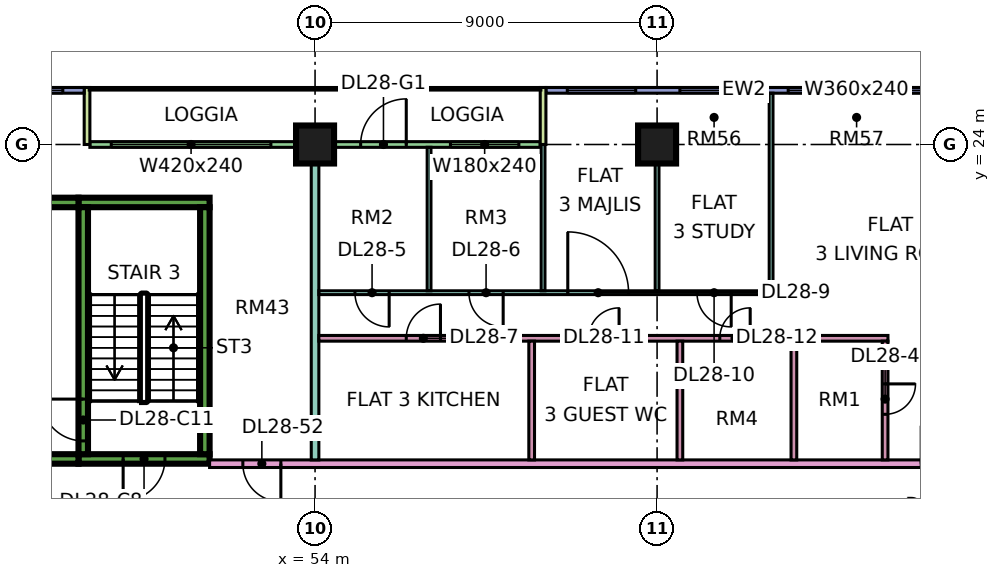
"""IFC4 building model, lengths in metres.
Left out: names, types, materials, properties, quantities, classifications, styles, units other than length and angle.
Written with IfcOpenShell. Run it as: python <this file> out.ifc"""

import sys

from ifc_helpers import new_model, si_unit, direction, frame, frame_2d, origin, origin_2d, place, context, subcontext, project, spatial, rectangle, extrude, element, fill, save


model = new_model("IFC4")
c1 = context("Model", 3, precision=1e-05, world=origin(), true_north=direction((0.0, 1.0)))
c2 = subcontext(c1, "Body", "Model", "MODEL_VIEW")
j1 = project(units=[si_unit("LENGTHUNIT", "METRE"), si_unit("PLANEANGLEUNIT", "RADIAN")], contexts=[c1])
p1 = place(None, origin())
s1 = spatial("IfcSite", under=j1, at=p1, CompositionType="ELEMENT")
p2 = place(p1, origin())
s2 = spatial("IfcBuilding", under=s1, at=p2, CompositionType="ELEMENT")
p3 = place(p2, frame((0.0, 0.0, 121.9)))
s3 = spatial("IfcBuildingStorey", under=s2, at=p3, CompositionType="ELEMENT", Elevation=121.9)
for number, where, z_axis, x_axis in (
    (1, (54.0, 24.0, 0.0), (0.0, 0.0, 1.0), (1.0, 0.0, 0.0)),
    (2, (63.0, 24.0, 0.0), (0.0, 0.0, 1.0), (1.0, 0.0, 0.0)),
):
    element("IfcColumn", number, at=place(p3, frame(where, z_axis=z_axis, x_axis=x_axis)), inside=s3, PredefinedType="COLUMN", context=c2, shape_type="SweptSolid", body=[
        extrude(rectangle(XDim=1.0, YDim=1.0, at=origin_2d()), origin(), (0.0, 0.0, 1.0), 3.75),
    ])
p4 = place(p3, frame((47.775, 15.725, 0.0), z_axis=(0.0, 0.0, 1.0), x_axis=(1.0, 0.0, 0.0)))
e3 = element("IfcWall", 3, at=p4, inside=s3, PredefinedType="SHEAR", context=c2, shape_type="SweptSolid", body=[
    extrude(rectangle(XDim=3.45, YDim=0.25, at=frame_2d((1.725, 0.0))), origin(), (0.0, 0.0, 1.0), 3.75),
])
p5 = place(p4, frame((1.175, 0.0, 0.0)))
e4 = element("IfcOpeningElement", 4, at=p5, cuts=e3, PredefinedType="OPENING", context=c2, shape_type="SweptSolid", body=[
    extrude(rectangle(XDim=1.1, YDim=2.2, at=frame_2d((0.55, 1.1))), frame((0.0, 0.135, 0.0), z_axis=(0.0, -1.0, 0.0), x_axis=(1.0, 0.0, 0.0)), (0.0, 0.0, 1.0), 0.27),
])
p6 = place(p3, frame((47.775, 22.475, 0.0), z_axis=(0.0, 0.0, 1.0), x_axis=(1.0, 0.0, 0.0)))
e5 = element("IfcWall", 5, at=p6, inside=s3, PredefinedType="SHEAR", context=c2, shape_type="SweptSolid", body=[
    extrude(rectangle(XDim=3.45, YDim=0.25, at=frame_2d((1.725, 0.0))), origin(), (0.0, 0.0, 1.0), 3.75),
])
p7 = place(p3, frame((47.9, 15.85, 0.0), z_axis=(0.0, 0.0, 1.0), x_axis=(0.0, 1.0, 0.0)))
e6 = element("IfcWall", 6, at=p7, inside=s3, PredefinedType="SHEAR", context=c2, shape_type="SweptSolid", body=[
    extrude(rectangle(XDim=6.5, YDim=0.25, at=frame_2d((3.25, 0.0))), origin(), (0.0, 0.0, 1.0), 3.75),
])
p8 = place(p7, frame((0.35, 0.0, 0.0)))
e7 = element("IfcOpeningElement", 7, at=p8, cuts=e6, PredefinedType="OPENING", context=c2, shape_type="SweptSolid", body=[
    extrude(rectangle(XDim=1.1, YDim=2.2, at=frame_2d((0.55, 1.1))), frame((0.0, 0.135, 0.0), z_axis=(0.0, -1.0, 0.0), x_axis=(1.0, 0.0, 0.0)), (0.0, 0.0, 1.0), 0.27),
])
p9 = place(p3, frame((51.1, 15.85, 0.0), z_axis=(0.0, 0.0, 1.0), x_axis=(0.0, 1.0, 0.0)))
e8 = element("IfcWall", 8, at=p9, inside=s3, PredefinedType="SHEAR", context=c2, shape_type="SweptSolid", body=[
    extrude(rectangle(XDim=6.5, YDim=0.25, at=frame_2d((3.25, 0.0))), origin(), (0.0, 0.0, 1.0), 3.75),
])
p10 = place(p3, frame((44.35, 15.725, 0.0), z_axis=(0.0, 0.0, 1.0), x_axis=(1.0, 0.0, 0.0)))
e9 = element("IfcWall", 9, at=p10, inside=s3, PredefinedType="SHEAR", context=c2, shape_type="SweptSolid", body=[
    extrude(rectangle(XDim=3.425, YDim=0.25, at=frame_2d((1.712, 0.0))), origin(), (0.0, 0.0, 1.0), 3.75),
])
p11 = place(p10, frame((1.25, 0.0, 0.0)))
e10 = element("IfcOpeningElement", 10, at=p11, cuts=e9, PredefinedType="OPENING", context=c2, shape_type="SweptSolid", body=[
    extrude(rectangle(XDim=1.2, YDim=2.2, at=frame_2d((0.6, 1.1))), frame((0.0, 0.135, 0.0), z_axis=(0.0, -1.0, 0.0), x_axis=(1.0, 0.0, 0.0)), (0.0, 0.0, 1.0), 0.27),
])
p12 = place(p3, frame((44.35, 22.475, 0.0), z_axis=(0.0, 0.0, 1.0), x_axis=(1.0, 0.0, 0.0)))
e11 = element("IfcWall", 11, at=p12, inside=s3, PredefinedType="SHEAR", context=c2, shape_type="SweptSolid", body=[
    extrude(rectangle(XDim=3.425, YDim=0.25, at=frame_2d((1.712, 0.0))), origin(), (0.0, 0.0, 1.0), 3.75),
])
p13 = place(p3, frame((70.5, 25.425, 0.0), z_axis=(0.0, 0.0, 1.0), x_axis=(-1.0, 0.0, 0.0)))
e12 = element("IfcWall", 12, at=p13, inside=s3, PredefinedType="SOLIDWALL", context=c2, shape_type="SweptSolid", body=[
    extrude(rectangle(XDim=10.425, YDim=0.15, at=frame_2d((5.212, 0.0))), origin(), (0.0, 0.0, 1.0), 3.35),
])
p14 = place(p13, frame((0.45, 0.0, 0.45)))
e13 = element("IfcOpeningElement", 13, at=p14, cuts=e12, PredefinedType="OPENING", context=c2, shape_type="SweptSolid", body=[
    extrude(rectangle(XDim=3.6, YDim=2.4, at=frame_2d((1.8, 1.2))), frame((0.0, 0.085, 0.0), z_axis=(0.0, -1.0, 0.0), x_axis=(1.0, 0.0, 0.0)), (0.0, 0.0, 1.0), 0.17),
])
p15 = place(p13, frame((5.1, 0.0, 0.45)))
e14 = element("IfcOpeningElement", 14, at=p15, cuts=e12, PredefinedType="OPENING", context=c2, shape_type="SweptSolid", body=[
    extrude(rectangle(XDim=1.8, YDim=2.4, at=frame_2d((0.9, 1.2))), frame((0.0, 0.085, 0.0), z_axis=(0.0, -1.0, 0.0), x_axis=(1.0, 0.0, 0.0)), (0.0, 0.0, 1.0), 0.17),
])
p16 = place(p13, frame((8.062, 0.0, 0.45)))
e15 = element("IfcOpeningElement", 15, at=p16, cuts=e12, PredefinedType="OPENING", context=c2, shape_type="SweptSolid", body=[
    extrude(rectangle(XDim=1.8, YDim=2.4, at=frame_2d((0.9, 1.2))), frame((0.0, 0.085, 0.0), z_axis=(0.0, -1.0, 0.0), x_axis=(1.0, 0.0, 0.0)), (0.0, 0.0, 1.0), 0.17),
])
p17 = place(p3, frame((59.925, 24.0, 0.0), z_axis=(0.0, 0.0, 1.0), x_axis=(-1.0, 0.0, 0.0)))
e16 = element("IfcWall", 16, at=p17, inside=s3, PredefinedType="SOLIDWALL", context=c2, shape_type="SweptSolid", body=[
    extrude(rectangle(XDim=11.85, YDim=0.15, at=frame_2d((5.925, 0.0))), origin(), (0.0, 0.0, 1.0), 3.35),
])
p18 = place(p17, frame((0.562, 0.0, 0.45)))
e17 = element("IfcOpeningElement", 17, at=p18, cuts=e16, PredefinedType="OPENING", context=c2, shape_type="SweptSolid", body=[
    extrude(rectangle(XDim=1.8, YDim=2.4, at=frame_2d((0.9, 1.2))), frame((0.0, 0.085, 0.0), z_axis=(0.0, -1.0, 0.0), x_axis=(1.0, 0.0, 0.0)), (0.0, 0.0, 1.0), 0.17),
])
p19 = place(p17, frame((3.525, 0.0, 0.0)))
e18 = element("IfcOpeningElement", 18, at=p19, cuts=e16, PredefinedType="OPENING", context=c2, shape_type="SweptSolid", body=[
    extrude(rectangle(XDim=1.2, YDim=2.4, at=frame_2d((0.6, 1.2))), frame((0.0, 0.085, 0.0), z_axis=(0.0, -1.0, 0.0), x_axis=(1.0, 0.0, 0.0)), (0.0, 0.0, 1.0), 0.17),
])
p20 = place(p17, frame((7.087, 0.0, 0.45)))
e19 = element("IfcOpeningElement", 19, at=p20, cuts=e16, PredefinedType="OPENING", context=c2, shape_type="SweptSolid", body=[
    extrude(rectangle(XDim=4.2, YDim=2.4, at=frame_2d((2.1, 1.2))), frame((0.0, 0.085, 0.0), z_axis=(0.0, -1.0, 0.0), x_axis=(1.0, 0.0, 0.0)), (0.0, 0.0, 1.0), 0.17),
])
for number, where, z_axis, x_axis in (
    (20, (60.0, 25.5, 0.0), (0.0, 0.0, 1.0), (0.0, -1.0, 0.0)),
    (21, (48.0, 25.5, 0.0), (0.0, 0.0, 1.0), (0.0, -1.0, 0.0)),
):
    element("IfcWall", number, at=place(p3, frame(where, z_axis=z_axis, x_axis=x_axis)), inside=s3, PredefinedType="SOLIDWALL", context=c2, shape_type="SweptSolid", body=[
        extrude(rectangle(XDim=1.5, YDim=0.15, at=frame_2d((0.75, 0.0))), origin(), (0.0, 0.0, 1.0), 3.35),
    ])
p21 = place(p3, frame((47.925, 25.425, 0.0), z_axis=(0.0, 0.0, 1.0), x_axis=(-1.0, 0.0, 0.0)))
e22 = element("IfcWall", 22, at=p21, inside=s3, PredefinedType="SOLIDWALL", context=c2, shape_type="SweptSolid", body=[
    extrude(rectangle(XDim=7.425, YDim=0.15, at=frame_2d((3.712, 0.0))), origin(), (0.0, 0.0, 1.0), 3.35),
])
p22 = place(p21, frame((0.562, 0.0, 0.45)))
e23 = element("IfcOpeningElement", 23, at=p22, cuts=e22, PredefinedType="OPENING", context=c2, shape_type="SweptSolid", body=[
    extrude(rectangle(XDim=1.8, YDim=2.4, at=frame_2d((0.9, 1.2))), frame((0.0, 0.085, 0.0), z_axis=(0.0, -1.0, 0.0), x_axis=(1.0, 0.0, 0.0)), (0.0, 0.0, 1.0), 0.17),
])
p23 = place(p21, frame((3.675, 0.0, 0.45)))
e24 = element("IfcOpeningElement", 24, at=p23, cuts=e22, PredefinedType="OPENING", context=c2, shape_type="SweptSolid", body=[
    extrude(rectangle(XDim=3.0, YDim=2.4, at=frame_2d((1.5, 1.2))), frame((0.0, 0.085, 0.0), z_axis=(0.0, -1.0, 0.0), x_axis=(1.0, 0.0, 0.0)), (0.0, 0.0, 1.0), 0.17),
])
p24 = place(p3, frame((51.225, 15.6, 0.0), z_axis=(0.0, 0.0, 1.0), x_axis=(1.0, 0.0, 0.0)))
e25 = element("IfcWall", 25, at=p24, inside=s3, PredefinedType="PARTITIONING", context=c2, shape_type="SweptSolid", body=[
    extrude(rectangle(XDim=22.125, YDim=0.2, at=frame_2d((11.062, 0.0))), origin(), (0.0, 0.0, 1.0), 3.35),
])
p25 = place(p24, frame((18.725, 0.0, 0.0)))
e26 = element("IfcOpeningElement", 26, at=p25, cuts=e25, PredefinedType="OPENING", context=c2, shape_type="SweptSolid", body=[
    extrude(rectangle(XDim=1.0, YDim=2.1, at=frame_2d((0.5, 1.05))), frame((0.0, 0.11, 0.0), z_axis=(0.0, -1.0, 0.0), x_axis=(1.0, 0.0, 0.0)), (0.0, 0.0, 1.0), 0.22),
])
p26 = place(p24, frame((0.875, 0.0, 0.0)))
e27 = element("IfcOpeningElement", 27, at=p26, cuts=e25, PredefinedType="OPENING", context=c2, shape_type="SweptSolid", body=[
    extrude(rectangle(XDim=1.0, YDim=2.1, at=frame_2d((0.5, 1.05))), frame((0.0, 0.11, 0.0), z_axis=(0.0, -1.0, 0.0), x_axis=(1.0, 0.0, 0.0)), (0.0, 0.0, 1.0), 0.22),
])
p27 = place(p3, frame((54.0, 15.7, 0.0), z_axis=(0.0, 0.0, 1.0), x_axis=(0.0, 1.0, 0.0)))
e28 = element("IfcWall", 28, at=p27, inside=s3, PredefinedType="PARTITIONING", context=c2, shape_type="SweptSolid", body=[
    extrude(rectangle(XDim=8.226, YDim=0.2, at=frame_2d((4.113, 0.0))), origin(), (0.0, 0.0, 1.0), 3.35),
])
p28 = place(p3, frame((54.1, 18.9, 0.0), z_axis=(0.0, 0.0, 1.0), x_axis=(1.0, 0.0, 0.0)))
e29 = element("IfcWall", 29, at=p28, inside=s3, PredefinedType="PARTITIONING", context=c2, shape_type="SweptSolid", body=[
    extrude(rectangle(XDim=14.975, YDim=0.15, at=frame_2d((7.487, 0.0))), origin(), (0.0, 0.0, 1.0), 3.35),
])
p29 = place(p28, frame((2.3, 0.0, 0.0)))
e30 = element("IfcOpeningElement", 30, at=p29, cuts=e29, PredefinedType="OPENING", context=c2, shape_type="SweptSolid", body=[
    extrude(rectangle(XDim=0.9, YDim=2.1, at=frame_2d((0.45, 1.05))), frame((0.0, 0.085, 0.0), z_axis=(0.0, -1.0, 0.0), x_axis=(1.0, 0.0, 0.0)), (0.0, 0.0, 1.0), 0.17),
])
p30 = place(p28, frame((7.1, 0.0, 0.0)))
e31 = element("IfcOpeningElement", 31, at=p30, cuts=e29, PredefinedType="OPENING", context=c2, shape_type="SweptSolid", body=[
    extrude(rectangle(XDim=0.8, YDim=2.1, at=frame_2d((0.4, 1.05))), frame((0.0, 0.085, 0.0), z_axis=(0.0, -1.0, 0.0), x_axis=(1.0, 0.0, 0.0)), (0.0, 0.0, 1.0), 0.17),
])
p31 = place(p28, frame((10.55, 0.0, 0.0)))
e32 = element("IfcOpeningElement", 32, at=p31, cuts=e29, PredefinedType="OPENING", context=c2, shape_type="SweptSolid", body=[
    extrude(rectangle(XDim=0.8, YDim=2.1, at=frame_2d((0.4, 1.05))), frame((0.0, 0.085, 0.0), z_axis=(0.0, -1.0, 0.0), x_axis=(1.0, 0.0, 0.0)), (0.0, 0.0, 1.0), 0.17),
])
p32 = place(p3, frame((54.1, 20.1, 0.0), z_axis=(0.0, 0.0, 1.0), x_axis=(1.0, 0.0, 0.0)))
e33 = element("IfcWall", 33, at=p32, inside=s3, PredefinedType="PARTITIONING", context=c2, shape_type="SweptSolid", body=[
    extrude(rectangle(XDim=11.95, YDim=0.1, at=frame_2d((5.975, 0.0))), origin(), (0.0, 0.0, 1.0), 3.35),
])
p33 = place(p32, frame((0.95, 0.0, 0.0)))
e34 = element("IfcOpeningElement", 34, at=p33, cuts=e33, PredefinedType="OPENING", context=c2, shape_type="SweptSolid", body=[
    extrude(rectangle(XDim=0.9, YDim=2.1, at=frame_2d((0.45, 1.05))), frame((0.0, 0.06, 0.0), z_axis=(0.0, -1.0, 0.0), x_axis=(1.0, 0.0, 0.0)), (0.0, 0.0, 1.0), 0.12),
])
p34 = place(p32, frame((3.95, 0.0, 0.0)))
e35 = element("IfcOpeningElement", 35, at=p34, cuts=e33, PredefinedType="OPENING", context=c2, shape_type="SweptSolid", body=[
    extrude(rectangle(XDim=0.9, YDim=2.1, at=frame_2d((0.45, 1.05))), frame((0.0, 0.06, 0.0), z_axis=(0.0, -1.0, 0.0), x_axis=(1.0, 0.0, 0.0)), (0.0, 0.0, 1.0), 0.12),
])
p35 = place(p32, frame((6.55, 0.0, 0.0)))
e36 = element("IfcOpeningElement", 36, at=p35, cuts=e33, PredefinedType="OPENING", context=c2, shape_type="SweptSolid", body=[
    extrude(rectangle(XDim=1.6, YDim=2.1, at=frame_2d((0.8, 1.05))), frame((0.0, 0.06, 0.0), z_axis=(0.0, -1.0, 0.0), x_axis=(1.0, 0.0, 0.0)), (0.0, 0.0, 1.0), 0.12),
])
p36 = place(p32, frame((9.95, 0.0, 0.0)))
e37 = element("IfcOpeningElement", 37, at=p36, cuts=e33, PredefinedType="OPENING", context=c2, shape_type="SweptSolid", body=[
    extrude(rectangle(XDim=0.9, YDim=2.1, at=frame_2d((0.45, 1.05))), frame((0.0, 0.06, 0.0), z_axis=(0.0, -1.0, 0.0), x_axis=(1.0, 0.0, 0.0)), (0.0, 0.0, 1.0), 0.12),
])
p37 = place(p3, frame((57.0, 20.15, 0.0), z_axis=(0.0, 0.0, 1.0), x_axis=(0.0, 1.0, 0.0)))
e38 = element("IfcWall", 38, at=p37, inside=s3, PredefinedType="PARTITIONING", context=c2, shape_type="SweptSolid", body=[
    extrude(rectangle(XDim=3.776, YDim=0.1, at=frame_2d((1.888, 0.0))), origin(), (0.0, 0.0, 1.0), 3.35),
])
p38 = place(p3, frame((59.7, 15.7, 0.0), z_axis=(0.0, 0.0, 1.0), x_axis=(0.0, 1.0, 0.0)))
e39 = element("IfcWall", 39, at=p38, inside=s3, PredefinedType="PARTITIONING", context=c2, shape_type="SweptSolid", body=[
    extrude(rectangle(XDim=3.125, YDim=0.15, at=frame_2d((1.562, 0.0))), origin(), (0.0, 0.0, 1.0), 3.35),
])
for number, where, z_axis, x_axis in (
    (40, (60.0, 20.15, 0.0), (0.0, 0.0, 1.0), (0.0, 1.0, 0.0)),
    (41, (63.0, 20.15, 0.0), (0.0, 0.0, 1.0), (0.0, 1.0, 0.0)),
):
    element("IfcWall", number, at=place(p3, frame(where, z_axis=z_axis, x_axis=x_axis)), inside=s3, PredefinedType="PARTITIONING", context=c2, shape_type="SweptSolid", body=[
        extrude(rectangle(XDim=3.85, YDim=0.1, at=frame_2d((1.925, 0.0))), origin(), (0.0, 0.0, 1.0), 3.35),
    ])
p39 = place(p3, frame((63.6, 15.7, 0.0), z_axis=(0.0, 0.0, 1.0), x_axis=(0.0, 1.0, 0.0)))
e42 = element("IfcWall", 42, at=p39, inside=s3, PredefinedType="PARTITIONING", context=c2, shape_type="SweptSolid", body=[
    extrude(rectangle(XDim=3.125, YDim=0.15, at=frame_2d((1.562, 0.0))), origin(), (0.0, 0.0, 1.0), 3.35),
])
p40 = place(p3, frame((66.0, 20.15, 0.0), z_axis=(0.0, 0.0, 1.0), x_axis=(0.0, 1.0, 0.0)))
e43 = element("IfcWall", 43, at=p40, inside=s3, PredefinedType="PARTITIONING", context=c2, shape_type="SweptSolid", body=[
    extrude(rectangle(XDim=5.2, YDim=0.1, at=frame_2d((2.6, 0.0))), origin(), (0.0, 0.0, 1.0), 3.35),
])
p41 = place(p3, frame((66.6, 15.7, 0.0), z_axis=(0.0, 0.0, 1.0), x_axis=(0.0, 1.0, 0.0)))
e44 = element("IfcWall", 44, at=p41, inside=s3, PredefinedType="PARTITIONING", context=c2, shape_type="SweptSolid", body=[
    extrude(rectangle(XDim=3.125, YDim=0.15, at=frame_2d((1.562, 0.0))), origin(), (0.0, 0.0, 1.0), 3.35),
])
p42 = place(p3, frame((69.0, 15.7, 0.0), z_axis=(0.0, 0.0, 1.0), x_axis=(0.0, 1.0, 0.0)))
e45 = element("IfcWall", 45, at=p42, inside=s3, PredefinedType="PARTITIONING", context=c2, shape_type="SweptSolid", body=[
    extrude(rectangle(XDim=3.125, YDim=0.15, at=frame_2d((1.562, 0.0))), origin(), (0.0, 0.0, 1.0), 3.35),
])
p43 = place(p42, frame((1.2, 0.0, 0.0)))
e46 = element("IfcOpeningElement", 46, at=p43, cuts=e45, PredefinedType="OPENING", context=c2, shape_type="SweptSolid", body=[
    extrude(rectangle(XDim=0.8, YDim=2.1, at=frame_2d((0.4, 1.05))), frame((0.0, 0.085, 0.0), z_axis=(0.0, -1.0, 0.0), x_axis=(1.0, 0.0, 0.0)), (0.0, 0.0, 1.0), 0.17),
])
p44 = place(p14, origin())
e47 = element("IfcWindow", 47, at=p44, inside=s3, PartitioningType="SINGLE_PANEL", PredefinedType="WINDOW", context=c2, shape_type="SweptSolid", body=[
    extrude(rectangle(XDim=3.6, YDim=2.4, at=frame_2d((1.8, 1.2))), frame((0.0, 0.03, 0.0), z_axis=(0.0, -1.0, 0.0), x_axis=(1.0, 0.0, 0.0)), (0.0, 0.0, 1.0), 0.06),
])
fill(e13, e47)
p45 = place(p15, origin())
e48 = element("IfcWindow", 48, at=p45, inside=s3, PartitioningType="SINGLE_PANEL", PredefinedType="WINDOW", context=c2, shape_type="SweptSolid", body=[
    extrude(rectangle(XDim=1.8, YDim=2.4, at=frame_2d((0.9, 1.2))), frame((0.0, 0.03, 0.0), z_axis=(0.0, -1.0, 0.0), x_axis=(1.0, 0.0, 0.0)), (0.0, 0.0, 1.0), 0.06),
])
fill(e14, e48)
p46 = place(p16, origin())
e49 = element("IfcWindow", 49, at=p46, inside=s3, PartitioningType="SINGLE_PANEL", PredefinedType="WINDOW", context=c2, shape_type="SweptSolid", body=[
    extrude(rectangle(XDim=1.8, YDim=2.4, at=frame_2d((0.9, 1.2))), frame((0.0, 0.03, 0.0), z_axis=(0.0, -1.0, 0.0), x_axis=(1.0, 0.0, 0.0)), (0.0, 0.0, 1.0), 0.06),
])
fill(e15, e49)
p47 = place(p18, origin())
e50 = element("IfcWindow", 50, at=p47, inside=s3, PartitioningType="SINGLE_PANEL", PredefinedType="WINDOW", context=c2, shape_type="SweptSolid", body=[
    extrude(rectangle(XDim=1.8, YDim=2.4, at=frame_2d((0.9, 1.2))), frame((0.0, 0.03, 0.0), z_axis=(0.0, -1.0, 0.0), x_axis=(1.0, 0.0, 0.0)), (0.0, 0.0, 1.0), 0.06),
])
fill(e17, e50)
p48 = place(p19, frame((1.2, 0.0, 0.0), z_axis=(0.0, 0.0, 1.0), x_axis=(-1.0, 0.0, 0.0)))
e51 = element("IfcDoor", 51, at=p48, inside=s3, OperationType="DOUBLE_DOOR_SINGLE_SWING", PredefinedType="DOOR", context=c2, shape_type="SweptSolid", body=[
    extrude(rectangle(XDim=1.2, YDim=2.4, at=frame_2d((0.6, 1.2))), frame((0.0, 0.025, 0.0), z_axis=(0.0, -1.0, 0.0), x_axis=(1.0, 0.0, 0.0)), (0.0, 0.0, 1.0), 0.05),
])
fill(e18, e51)
p49 = place(p20, origin())
e52 = element("IfcWindow", 52, at=p49, inside=s3, PartitioningType="SINGLE_PANEL", PredefinedType="WINDOW", context=c2, shape_type="SweptSolid", body=[
    extrude(rectangle(XDim=4.2, YDim=2.4, at=frame_2d((2.1, 1.2))), frame((0.0, 0.03, 0.0), z_axis=(0.0, -1.0, 0.0), x_axis=(1.0, 0.0, 0.0)), (0.0, 0.0, 1.0), 0.06),
])
fill(e19, e52)
p50 = place(p22, origin())
e53 = element("IfcWindow", 53, at=p50, inside=s3, PartitioningType="SINGLE_PANEL", PredefinedType="WINDOW", context=c2, shape_type="SweptSolid", body=[
    extrude(rectangle(XDim=1.8, YDim=2.4, at=frame_2d((0.9, 1.2))), frame((0.0, 0.03, 0.0), z_axis=(0.0, -1.0, 0.0), x_axis=(1.0, 0.0, 0.0)), (0.0, 0.0, 1.0), 0.06),
])
fill(e23, e53)
p51 = place(p5, frame((1.1, 0.0, 0.0), z_axis=(0.0, 0.0, 1.0), x_axis=(-1.0, 0.0, 0.0)))
e54 = element("IfcDoor", 54, at=p51, inside=s3, OperationType="SINGLE_SWING_LEFT", PredefinedType="DOOR", context=c2, shape_type="SweptSolid", body=[
    extrude(rectangle(XDim=1.1, YDim=2.2, at=frame_2d((0.55, 1.1))), frame((0.0, 0.025, 0.0), z_axis=(0.0, -1.0, 0.0), x_axis=(1.0, 0.0, 0.0)), (0.0, 0.0, 1.0), 0.05),
])
fill(e4, e54)
p52 = place(p8, frame((1.1, 0.0, 0.0), z_axis=(0.0, 0.0, 1.0), x_axis=(-1.0, 0.0, 0.0)))
e55 = element("IfcDoor", 55, at=p52, inside=s3, OperationType="SINGLE_SWING_RIGHT", PredefinedType="DOOR", context=c2, shape_type="SweptSolid", body=[
    extrude(rectangle(XDim=1.1, YDim=2.2, at=frame_2d((0.55, 1.1))), frame((0.0, 0.025, 0.0), z_axis=(0.0, -1.0, 0.0), x_axis=(1.0, 0.0, 0.0)), (0.0, 0.0, 1.0), 0.05),
])
fill(e7, e55)
p53 = place(p43, origin())
e56 = element("IfcDoor", 56, at=p53, inside=s3, OperationType="SINGLE_SWING_RIGHT", PredefinedType="DOOR", context=c2, shape_type="SweptSolid", body=[
    extrude(rectangle(XDim=0.8, YDim=2.1, at=frame_2d((0.4, 1.05))), frame((0.0, 0.025, 0.0), z_axis=(0.0, -1.0, 0.0), x_axis=(1.0, 0.0, 0.0)), (0.0, 0.0, 1.0), 0.05),
])
fill(e46, e56)
p54 = place(p33, origin())
e57 = element("IfcDoor", 57, at=p54, inside=s3, OperationType="SINGLE_SWING_RIGHT", PredefinedType="DOOR", context=c2, shape_type="SweptSolid", body=[
    extrude(rectangle(XDim=0.9, YDim=2.1, at=frame_2d((0.45, 1.05))), frame((0.0, 0.025, 0.0), z_axis=(0.0, -1.0, 0.0), x_axis=(1.0, 0.0, 0.0)), (0.0, 0.0, 1.0), 0.05),
])
fill(e34, e57)
p55 = place(p34, origin())
e58 = element("IfcDoor", 58, at=p55, inside=s3, OperationType="SINGLE_SWING_RIGHT", PredefinedType="DOOR", context=c2, shape_type="SweptSolid", body=[
    extrude(rectangle(XDim=0.9, YDim=2.1, at=frame_2d((0.45, 1.05))), frame((0.0, 0.025, 0.0), z_axis=(0.0, -1.0, 0.0), x_axis=(1.0, 0.0, 0.0)), (0.0, 0.0, 1.0), 0.05),
])
fill(e35, e58)
p56 = place(p29, frame((0.9, 0.0, 0.0), z_axis=(0.0, 0.0, 1.0), x_axis=(-1.0, 0.0, 0.0)))
e59 = element("IfcDoor", 59, at=p56, inside=s3, OperationType="SINGLE_SWING_RIGHT", PredefinedType="DOOR", context=c2, shape_type="SweptSolid", body=[
    extrude(rectangle(XDim=0.9, YDim=2.1, at=frame_2d((0.45, 1.05))), frame((0.0, 0.025, 0.0), z_axis=(0.0, -1.0, 0.0), x_axis=(1.0, 0.0, 0.0)), (0.0, 0.0, 1.0), 0.05),
])
fill(e30, e59)
p57 = place(p35, origin())
e60 = element("IfcDoor", 60, at=p57, inside=s3, OperationType="DOUBLE_DOOR_SINGLE_SWING", PredefinedType="DOOR", context=c2, shape_type="SweptSolid", body=[
    extrude(rectangle(XDim=1.6, YDim=2.1, at=frame_2d((0.8, 1.05))), frame((0.0, 0.025, 0.0), z_axis=(0.0, -1.0, 0.0), x_axis=(1.0, 0.0, 0.0)), (0.0, 0.0, 1.0), 0.05),
])
fill(e36, e60)
p58 = place(p36, origin())
e61 = element("IfcDoor", 61, at=p58, inside=s3, OperationType="SINGLE_SWING_RIGHT", PredefinedType="DOOR", context=c2, shape_type="SweptSolid", body=[
    extrude(rectangle(XDim=0.9, YDim=2.1, at=frame_2d((0.45, 1.05))), frame((0.0, 0.025, 0.0), z_axis=(0.0, -1.0, 0.0), x_axis=(1.0, 0.0, 0.0)), (0.0, 0.0, 1.0), 0.05),
])
fill(e37, e61)
p59 = place(p30, frame((0.8, 0.0, 0.0), z_axis=(0.0, 0.0, 1.0), x_axis=(-1.0, 0.0, 0.0)))
e62 = element("IfcDoor", 62, at=p59, inside=s3, OperationType="SINGLE_SWING_RIGHT", PredefinedType="DOOR", context=c2, shape_type="SweptSolid", body=[
    extrude(rectangle(XDim=0.8, YDim=2.1, at=frame_2d((0.4, 1.05))), frame((0.0, 0.025, 0.0), z_axis=(0.0, -1.0, 0.0), x_axis=(1.0, 0.0, 0.0)), (0.0, 0.0, 1.0), 0.05),
])
fill(e31, e62)
p60 = place(p31, frame((0.8, 0.0, 0.0), z_axis=(0.0, 0.0, 1.0), x_axis=(-1.0, 0.0, 0.0)))
e63 = element("IfcDoor", 63, at=p60, inside=s3, OperationType="SINGLE_SWING_RIGHT", PredefinedType="DOOR", context=c2, shape_type="SweptSolid", body=[
    extrude(rectangle(XDim=0.8, YDim=2.1, at=frame_2d((0.4, 1.05))), frame((0.0, 0.025, 0.0), z_axis=(0.0, -1.0, 0.0), x_axis=(1.0, 0.0, 0.0)), (0.0, 0.0, 1.0), 0.05),
])
fill(e32, e63)
p61 = place(p26, origin())
e64 = element("IfcDoor", 64, at=p61, inside=s3, OperationType="SINGLE_SWING_RIGHT", PredefinedType="DOOR", context=c2, shape_type="SweptSolid", body=[
    extrude(rectangle(XDim=1.0, YDim=2.1, at=frame_2d((0.5, 1.05))), frame((0.0, 0.025, 0.0), z_axis=(0.0, -1.0, 0.0), x_axis=(1.0, 0.0, 0.0)), (0.0, 0.0, 1.0), 0.05),
])
fill(e27, e64)
save(model, sys.argv[1])
